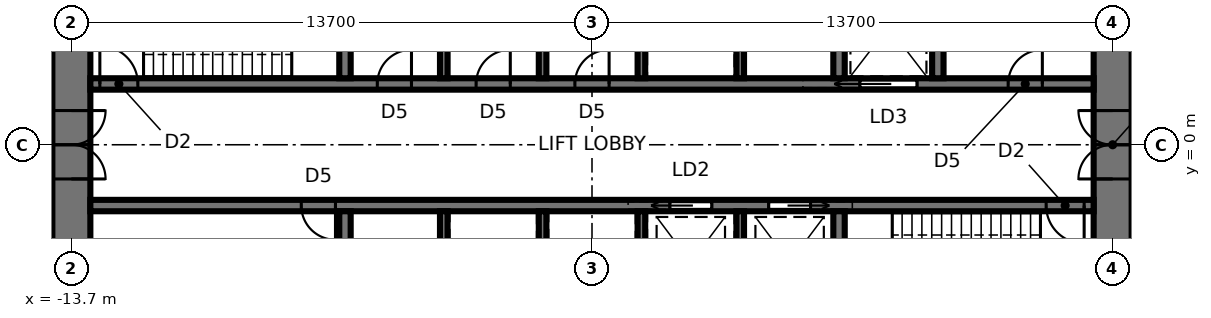
"""IFC4 building model, lengths in metres.
Left out: names, types, materials, properties, quantities, classifications, styles, units other than length and angle.
Written with IfcOpenShell. Run it as: python <this file> out.ifc"""

import sys

from ifc_helpers import new_model, si_unit, direction, frame, frame_2d, origin, place, context, subcontext, project, spatial, rectangle, extrude, element, fill, save


model = new_model("IFC4")
c1 = context("Model", 3, precision=1e-05, world=origin(), true_north=direction((0.0, 1.0)))
c2 = subcontext(c1, "Body", "Model", "MODEL_VIEW")
j1 = project(units=[si_unit("LENGTHUNIT", "METRE"), si_unit("PLANEANGLEUNIT", "RADIAN")], contexts=[c1])
p1 = place(None, origin())
s1 = spatial("IfcSite", under=j1, at=p1, CompositionType="ELEMENT")
p2 = place(p1, origin())
s2 = spatial("IfcBuilding", under=s1, at=p2, CompositionType="ELEMENT")
p3 = place(p2, frame((0.0, 0.0, 86.8)))
s3 = spatial("IfcBuildingStorey", under=s2, at=p3, CompositionType="ELEMENT", Elevation=86.8)
p4 = place(p3, frame((13.7, -9.5, 0.0), z_axis=(0.0, 0.0, 1.0), x_axis=(0.0, 1.0, 0.0)))
e1 = element("IfcWall", 1, at=p4, inside=s3, PredefinedType="SHEAR", context=c2, shape_type="SweptSolid", body=[
    extrude(rectangle(XDim=19.0, YDim=1.0, at=frame_2d((9.5, 0.0))), origin(), (0.0, 0.0, 1.0), 5.6),
])
p5 = place(p4, frame((8.6, 0.0, 0.0)))
e2 = element("IfcOpeningElement", 2, at=p5, cuts=e1, PredefinedType="OPENING", context=c2, shape_type="SweptSolid", body=[
    extrude(rectangle(XDim=1.8, YDim=2.4, at=frame_2d((0.9, 1.2))), frame((0.0, 0.51, 0.0), z_axis=(0.0, -1.0, 0.0), x_axis=(1.0, 0.0, 0.0)), (0.0, 0.0, 1.0), 1.02),
])
p6 = place(p3, frame((-13.7, 9.5, 0.0), z_axis=(0.0, 0.0, 1.0), x_axis=(0.0, -1.0, 0.0)))
e3 = element("IfcWall", 3, at=p6, inside=s3, PredefinedType="SHEAR", context=c2, shape_type="SweptSolid", body=[
    extrude(rectangle(XDim=19.0, YDim=1.0, at=frame_2d((9.5, 0.0))), origin(), (0.0, 0.0, 1.0), 5.6),
])
p7 = place(p6, frame((8.6, 0.0, 0.0)))
e4 = element("IfcOpeningElement", 4, at=p7, cuts=e3, PredefinedType="OPENING", context=c2, shape_type="SweptSolid", body=[
    extrude(rectangle(XDim=1.8, YDim=2.4, at=frame_2d((0.9, 1.2))), frame((0.0, 0.51, 0.0), z_axis=(0.0, -1.0, 0.0), x_axis=(1.0, 0.0, 0.0)), (0.0, 0.0, 1.0), 1.02),
])
p8 = place(p3, frame((-13.2, 1.6, 0.0), z_axis=(0.0, 0.0, 1.0), x_axis=(1.0, 0.0, 0.0)))
e5 = element("IfcWall", 5, at=p8, inside=s3, PredefinedType="SHEAR", context=c2, shape_type="SweptSolid", body=[
    extrude(rectangle(XDim=26.4, YDim=0.3, at=frame_2d((13.2, 0.0))), origin(), (0.0, 0.0, 1.0), 5.6),
])
p9 = place(p8, frame((0.25, 0.0, 0.0)))
e6 = element("IfcOpeningElement", 6, at=p9, cuts=e5, PredefinedType="OPENING", context=c2, shape_type="SweptSolid", body=[
    extrude(rectangle(XDim=1.0, YDim=2.1, at=frame_2d((0.5, 1.05))), frame((0.0, 0.16, 0.0), z_axis=(0.0, -1.0, 0.0), x_axis=(1.0, 0.0, 0.0)), (0.0, 0.0, 1.0), 0.32),
])
p10 = place(p8, frame((20.25, 0.0, 0.0)))
e7 = element("IfcOpeningElement", 7, at=p10, cuts=e5, PredefinedType="OPENING", context=c2, shape_type="SweptSolid", body=[
    extrude(rectangle(XDim=1.5, YDim=2.4, at=frame_2d((0.75, 1.2))), frame((0.0, 0.16, 0.0), z_axis=(0.0, -1.0, 0.0), x_axis=(1.0, 0.0, 0.0)), (0.0, 0.0, 1.0), 0.32),
])
p11 = place(p8, frame((7.55, 0.0, 0.0)))
e8 = element("IfcOpeningElement", 8, at=p11, cuts=e5, PredefinedType="OPENING", context=c2, shape_type="SweptSolid", body=[
    extrude(rectangle(XDim=0.9, YDim=2.1, at=frame_2d((0.45, 1.05))), frame((0.0, 0.16, 0.0), z_axis=(0.0, -1.0, 0.0), x_axis=(1.0, 0.0, 0.0)), (0.0, 0.0, 1.0), 0.32),
])
p12 = place(p8, frame((10.15, 0.0, 0.0)))
e9 = element("IfcOpeningElement", 9, at=p12, cuts=e5, PredefinedType="OPENING", context=c2, shape_type="SweptSolid", body=[
    extrude(rectangle(XDim=0.9, YDim=2.1, at=frame_2d((0.45, 1.05))), frame((0.0, 0.16, 0.0), z_axis=(0.0, -1.0, 0.0), x_axis=(1.0, 0.0, 0.0)), (0.0, 0.0, 1.0), 0.32),
])
p13 = place(p8, frame((12.75, 0.0, 0.0)))
e10 = element("IfcOpeningElement", 10, at=p13, cuts=e5, PredefinedType="OPENING", context=c2, shape_type="SweptSolid", body=[
    extrude(rectangle(XDim=0.9, YDim=2.1, at=frame_2d((0.45, 1.05))), frame((0.0, 0.16, 0.0), z_axis=(0.0, -1.0, 0.0), x_axis=(1.0, 0.0, 0.0)), (0.0, 0.0, 1.0), 0.32),
])
p14 = place(p8, frame((24.15, 0.0, 0.0)))
e11 = element("IfcOpeningElement", 11, at=p14, cuts=e5, PredefinedType="OPENING", context=c2, shape_type="SweptSolid", body=[
    extrude(rectangle(XDim=0.9, YDim=2.1, at=frame_2d((0.45, 1.05))), frame((0.0, 0.16, 0.0), z_axis=(0.0, -1.0, 0.0), x_axis=(1.0, 0.0, 0.0)), (0.0, 0.0, 1.0), 0.32),
])
p15 = place(p3, frame((-13.2, -1.6, 0.0), z_axis=(0.0, 0.0, 1.0), x_axis=(1.0, 0.0, 0.0)))
e12 = element("IfcWall", 12, at=p15, inside=s3, PredefinedType="SHEAR", context=c2, shape_type="SweptSolid", body=[
    extrude(rectangle(XDim=26.4, YDim=0.3, at=frame_2d((13.2, 0.0))), origin(), (0.0, 0.0, 1.0), 5.6),
])
p16 = place(p15, frame((25.15, 0.0, 0.0)))
e13 = element("IfcOpeningElement", 13, at=p16, cuts=e12, PredefinedType="OPENING", context=c2, shape_type="SweptSolid", body=[
    extrude(rectangle(XDim=1.0, YDim=2.1, at=frame_2d((0.5, 1.05))), frame((0.0, 0.16, 0.0), z_axis=(0.0, -1.0, 0.0), x_axis=(1.0, 0.0, 0.0)), (0.0, 0.0, 1.0), 0.32),
])
p17 = place(p15, frame((15.25, 0.0, 0.0)))
e14 = element("IfcOpeningElement", 14, at=p17, cuts=e12, PredefinedType="OPENING", context=c2, shape_type="SweptSolid", body=[
    extrude(rectangle(XDim=1.1, YDim=2.3, at=frame_2d((0.55, 1.15))), frame((0.0, 0.16, 0.0), z_axis=(0.0, -1.0, 0.0), x_axis=(1.0, 0.0, 0.0)), (0.0, 0.0, 1.0), 0.32),
])
p18 = place(p15, frame((17.85, 0.0, 0.0)))
e15 = element("IfcOpeningElement", 15, at=p18, cuts=e12, PredefinedType="OPENING", context=c2, shape_type="SweptSolid", body=[
    extrude(rectangle(XDim=1.1, YDim=2.3, at=frame_2d((0.55, 1.15))), frame((0.0, 0.16, 0.0), z_axis=(0.0, -1.0, 0.0), x_axis=(1.0, 0.0, 0.0)), (0.0, 0.0, 1.0), 0.32),
])
p19 = place(p15, frame((5.55, 0.0, 0.0)))
e16 = element("IfcOpeningElement", 16, at=p19, cuts=e12, PredefinedType="OPENING", context=c2, shape_type="SweptSolid", body=[
    extrude(rectangle(XDim=0.9, YDim=2.1, at=frame_2d((0.45, 1.05))), frame((0.0, 0.16, 0.0), z_axis=(0.0, -1.0, 0.0), x_axis=(1.0, 0.0, 0.0)), (0.0, 0.0, 1.0), 0.32),
])
for number, where, z_axis, x_axis in (
    (17, (-6.5, 1.75, 0.0), (0.0, 0.0, 1.0), (0.0, 1.0, 0.0)),
    (18, (6.5, 1.75, 0.0), (0.0, 0.0, 1.0), (0.0, 1.0, 0.0)),
):
    element("IfcWall", number, at=place(p3, frame(where, z_axis=z_axis, x_axis=x_axis)), inside=s3, PredefinedType="SHEAR", context=c2, shape_type="SweptSolid", body=[
        extrude(rectangle(XDim=2.7, YDim=0.3, at=frame_2d((1.35, 0.0))), origin(), (0.0, 0.0, 1.0), 5.6),
    ])
for number, where, z_axis, x_axis in (
    (19, (-3.9, 1.75, 0.0), (0.0, 0.0, 1.0), (0.0, 1.0, 0.0)),
    (20, (-1.3, 1.75, 0.0), (0.0, 0.0, 1.0), (0.0, 1.0, 0.0)),
    (21, (1.3, 1.75, 0.0), (0.0, 0.0, 1.0), (0.0, 1.0, 0.0)),
    (22, (3.9, 1.75, 0.0), (0.0, 0.0, 1.0), (0.0, 1.0, 0.0)),
):
    element("IfcWall", number, at=place(p3, frame(where, z_axis=z_axis, x_axis=x_axis)), inside=s3, PredefinedType="SHEAR", context=c2, shape_type="SweptSolid", body=[
        extrude(rectangle(XDim=2.7, YDim=0.2, at=frame_2d((1.35, 0.0))), origin(), (0.0, 0.0, 1.0), 5.6),
    ])
for number, where, z_axis, x_axis in (
    (23, (-6.5, -1.75, 0.0), (0.0, 0.0, 1.0), (0.0, -1.0, 0.0)),
    (24, (6.5, -1.75, 0.0), (0.0, 0.0, 1.0), (0.0, -1.0, 0.0)),
):
    element("IfcWall", number, at=place(p3, frame(where, z_axis=z_axis, x_axis=x_axis)), inside=s3, PredefinedType="SHEAR", context=c2, shape_type="SweptSolid", body=[
        extrude(rectangle(XDim=2.7, YDim=0.3, at=frame_2d((1.35, 0.0))), origin(), (0.0, 0.0, 1.0), 5.6),
    ])
for number, where, z_axis, x_axis in (
    (25, (-3.9, -1.75, 0.0), (0.0, 0.0, 1.0), (0.0, -1.0, 0.0)),
    (26, (-1.3, -1.75, 0.0), (0.0, 0.0, 1.0), (0.0, -1.0, 0.0)),
    (27, (1.3, -1.75, 0.0), (0.0, 0.0, 1.0), (0.0, -1.0, 0.0)),
    (28, (3.9, -1.75, 0.0), (0.0, 0.0, 1.0), (0.0, -1.0, 0.0)),
):
    element("IfcWall", number, at=place(p3, frame(where, z_axis=z_axis, x_axis=x_axis)), inside=s3, PredefinedType="SHEAR", context=c2, shape_type="SweptSolid", body=[
        extrude(rectangle(XDim=2.7, YDim=0.2, at=frame_2d((1.35, 0.0))), origin(), (0.0, 0.0, 1.0), 5.6),
    ])
p20 = place(p3, frame((9.1, 1.75, 0.0), z_axis=(0.0, 0.0, 1.0), x_axis=(0.0, 1.0, 0.0)))
e29 = element("IfcWall", 29, at=p20, inside=s3, PredefinedType="SHEAR", context=c2, shape_type="SweptSolid", body=[
    extrude(rectangle(XDim=2.7, YDim=0.3, at=frame_2d((1.35, 0.0))), origin(), (0.0, 0.0, 1.0), 5.6),
])
p21 = place(p7, origin())
e30 = element("IfcDoor", 30, at=p21, inside=s3, OperationType="DOUBLE_DOOR_SINGLE_SWING", PredefinedType="DOOR", context=c2, shape_type="SweptSolid", body=[
    extrude(rectangle(XDim=1.72, YDim=2.36, at=frame_2d((0.9, 1.18))), frame((0.0, 0.025, 0.0), z_axis=(0.0, -1.0, 0.0), x_axis=(1.0, 0.0, 0.0)), (0.0, 0.0, 1.0), 0.05),
    extrude(rectangle(XDim=0.04, YDim=2.4, at=frame_2d((0.02, 1.2))), frame((0.0, 0.25, 0.0), z_axis=(0.0, -1.0, 0.0), x_axis=(1.0, 0.0, 0.0)), (0.0, 0.0, 1.0), 0.5),
    extrude(rectangle(XDim=0.04, YDim=2.4, at=frame_2d((1.78, 1.2))), frame((0.0, 0.25, 0.0), z_axis=(0.0, -1.0, 0.0), x_axis=(1.0, 0.0, 0.0)), (0.0, 0.0, 1.0), 0.5),
    extrude(rectangle(XDim=1.72, YDim=0.04, at=frame_2d((0.9, 2.38))), frame((0.0, 0.25, 0.0), z_axis=(0.0, -1.0, 0.0), x_axis=(1.0, 0.0, 0.0)), (0.0, 0.0, 1.0), 0.5),
])
fill(e4, e30)
p22 = place(p5, origin())
e31 = element("IfcDoor", 31, at=p22, inside=s3, OperationType="DOUBLE_DOOR_SINGLE_SWING", PredefinedType="DOOR", context=c2, shape_type="SweptSolid", body=[
    extrude(rectangle(XDim=1.72, YDim=2.36, at=frame_2d((0.9, 1.18))), frame((0.0, 0.025, 0.0), z_axis=(0.0, -1.0, 0.0), x_axis=(1.0, 0.0, 0.0)), (0.0, 0.0, 1.0), 0.05),
    extrude(rectangle(XDim=0.04, YDim=2.4, at=frame_2d((0.02, 1.2))), frame((0.0, 0.25, 0.0), z_axis=(0.0, -1.0, 0.0), x_axis=(1.0, 0.0, 0.0)), (0.0, 0.0, 1.0), 0.5),
    extrude(rectangle(XDim=0.04, YDim=2.4, at=frame_2d((1.78, 1.2))), frame((0.0, 0.25, 0.0), z_axis=(0.0, -1.0, 0.0), x_axis=(1.0, 0.0, 0.0)), (0.0, 0.0, 1.0), 0.5),
    extrude(rectangle(XDim=1.72, YDim=0.04, at=frame_2d((0.9, 2.38))), frame((0.0, 0.25, 0.0), z_axis=(0.0, -1.0, 0.0), x_axis=(1.0, 0.0, 0.0)), (0.0, 0.0, 1.0), 0.5),
])
fill(e2, e31)
p23 = place(p9, origin())
e32 = element("IfcDoor", 32, at=p23, inside=s3, OperationType="SINGLE_SWING_LEFT", PredefinedType="DOOR", context=c2, shape_type="SweptSolid", body=[
    extrude(rectangle(XDim=1.0, YDim=2.1, at=frame_2d((0.5, 1.05))), frame((0.0, 0.025, 0.0), z_axis=(0.0, -1.0, 0.0), x_axis=(1.0, 0.0, 0.0)), (0.0, 0.0, 1.0), 0.05),
])
fill(e6, e32)
p24 = place(p16, frame((1.0, 0.0, 0.0), z_axis=(0.0, 0.0, 1.0), x_axis=(-1.0, 0.0, 0.0)))
e33 = element("IfcDoor", 33, at=p24, inside=s3, OperationType="SINGLE_SWING_LEFT", PredefinedType="DOOR", context=c2, shape_type="SweptSolid", body=[
    extrude(rectangle(XDim=1.0, YDim=2.1, at=frame_2d((0.5, 1.05))), frame((0.0, 0.025, 0.0), z_axis=(0.0, -1.0, 0.0), x_axis=(1.0, 0.0, 0.0)), (0.0, 0.0, 1.0), 0.05),
])
fill(e13, e33)
p25 = place(p10, origin())
e34 = element("IfcDoor", 34, at=p25, inside=s3, OperationType="SLIDING_TO_LEFT", PredefinedType="DOOR", context=c2, shape_type="SweptSolid", body=[
    extrude(rectangle(XDim=1.5, YDim=2.4, at=frame_2d((0.75, 1.2))), frame((0.0, 0.025, 0.0), z_axis=(0.0, -1.0, 0.0), x_axis=(1.0, 0.0, 0.0)), (0.0, 0.0, 1.0), 0.05),
])
fill(e7, e34)
p26 = place(p11, origin())
e35 = element("IfcDoor", 35, at=p26, inside=s3, OperationType="SINGLE_SWING_RIGHT", PredefinedType="DOOR", context=c2, shape_type="SweptSolid", body=[
    extrude(rectangle(XDim=0.9, YDim=2.1, at=frame_2d((0.45, 1.05))), frame((0.0, 0.025, 0.0), z_axis=(0.0, -1.0, 0.0), x_axis=(1.0, 0.0, 0.0)), (0.0, 0.0, 1.0), 0.05),
])
fill(e8, e35)
p27 = place(p12, origin())
e36 = element("IfcDoor", 36, at=p27, inside=s3, OperationType="SINGLE_SWING_RIGHT", PredefinedType="DOOR", context=c2, shape_type="SweptSolid", body=[
    extrude(rectangle(XDim=0.9, YDim=2.1, at=frame_2d((0.45, 1.05))), frame((0.0, 0.025, 0.0), z_axis=(0.0, -1.0, 0.0), x_axis=(1.0, 0.0, 0.0)), (0.0, 0.0, 1.0), 0.05),
])
fill(e9, e36)
p28 = place(p13, origin())
e37 = element("IfcDoor", 37, at=p28, inside=s3, OperationType="SINGLE_SWING_RIGHT", PredefinedType="DOOR", context=c2, shape_type="SweptSolid", body=[
    extrude(rectangle(XDim=0.9, YDim=2.1, at=frame_2d((0.45, 1.05))), frame((0.0, 0.025, 0.0), z_axis=(0.0, -1.0, 0.0), x_axis=(1.0, 0.0, 0.0)), (0.0, 0.0, 1.0), 0.05),
])
fill(e10, e37)
p29 = place(p17, frame((1.1, 0.0, 0.0), z_axis=(0.0, 0.0, 1.0), x_axis=(-1.0, 0.0, 0.0)))
e38 = element("IfcDoor", 38, at=p29, inside=s3, OperationType="SLIDING_TO_RIGHT", PredefinedType="DOOR", context=c2, shape_type="SweptSolid", body=[
    extrude(rectangle(XDim=1.1, YDim=2.3, at=frame_2d((0.55, 1.15))), frame((0.0, 0.025, 0.0), z_axis=(0.0, -1.0, 0.0), x_axis=(1.0, 0.0, 0.0)), (0.0, 0.0, 1.0), 0.05),
])
fill(e14, e38)
p30 = place(p18, frame((1.1, 0.0, 0.0), z_axis=(0.0, 0.0, 1.0), x_axis=(-1.0, 0.0, 0.0)))
e39 = element("IfcDoor", 39, at=p30, inside=s3, OperationType="SLIDING_TO_LEFT", PredefinedType="DOOR", context=c2, shape_type="SweptSolid", body=[
    extrude(rectangle(XDim=1.1, YDim=2.3, at=frame_2d((0.55, 1.15))), frame((0.0, 0.025, 0.0), z_axis=(0.0, -1.0, 0.0), x_axis=(1.0, 0.0, 0.0)), (0.0, 0.0, 1.0), 0.05),
])
fill(e15, e39)
p31 = place(p14, origin())
e40 = element("IfcDoor", 40, at=p31, inside=s3, OperationType="SINGLE_SWING_RIGHT", PredefinedType="DOOR", context=c2, shape_type="SweptSolid", body=[
    extrude(rectangle(XDim=0.9, YDim=2.1, at=frame_2d((0.45, 1.05))), frame((0.0, 0.025, 0.0), z_axis=(0.0, -1.0, 0.0), x_axis=(1.0, 0.0, 0.0)), (0.0, 0.0, 1.0), 0.05),
])
fill(e11, e40)
p32 = place(p19, frame((0.9, 0.0, 0.0), z_axis=(0.0, 0.0, 1.0), x_axis=(-1.0, 0.0, 0.0)))
e41 = element("IfcDoor", 41, at=p32, inside=s3, OperationType="SINGLE_SWING_LEFT", PredefinedType="DOOR", context=c2, shape_type="SweptSolid", body=[
    extrude(rectangle(XDim=0.9, YDim=2.1, at=frame_2d((0.45, 1.05))), frame((0.0, 0.025, 0.0), z_axis=(0.0, -1.0, 0.0), x_axis=(1.0, 0.0, 0.0)), (0.0, 0.0, 1.0), 0.05),
])
fill(e16, e41)
save(model, sys.argv[1])
